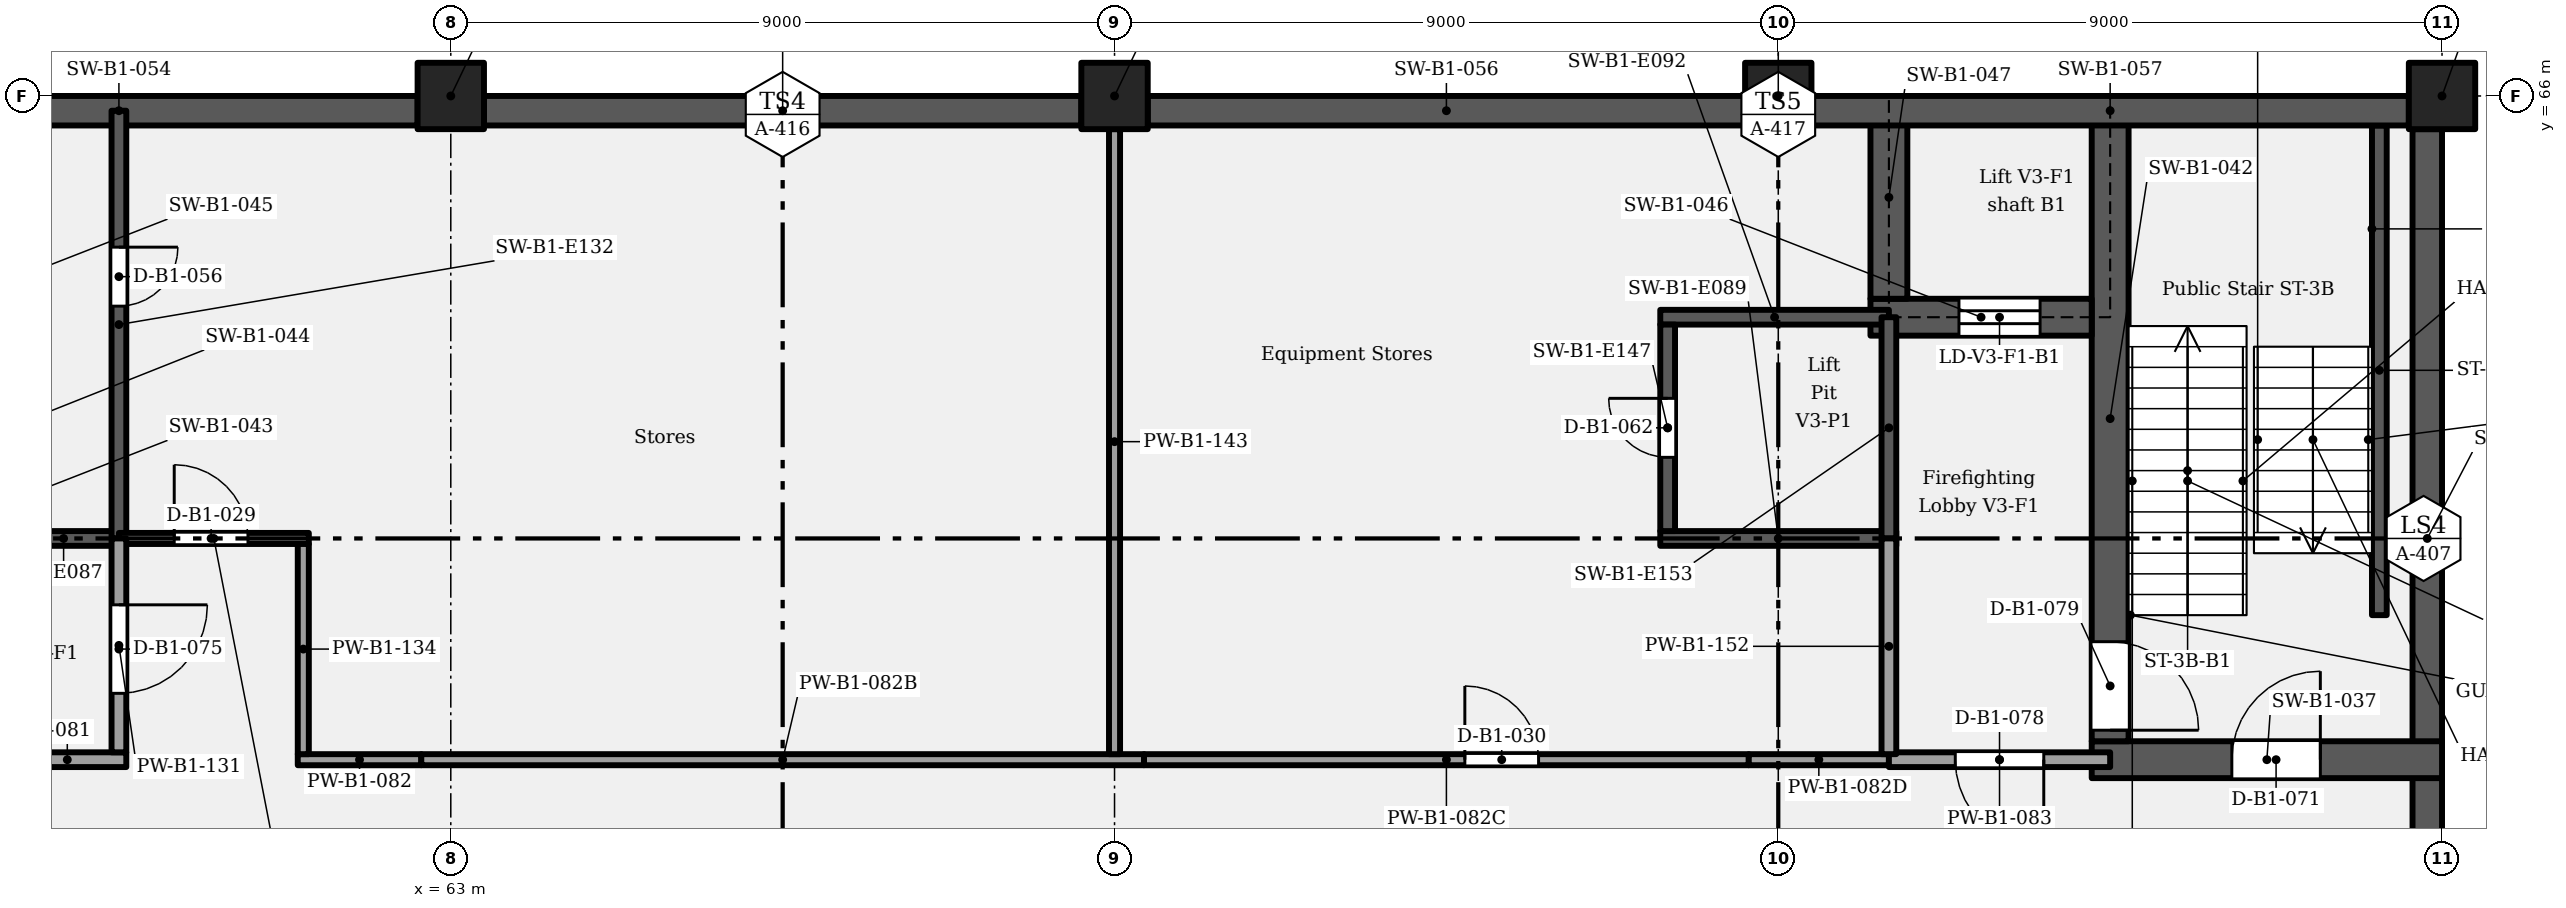
"""IFC4 building model, lengths in metres.
Left out: names, types, materials, properties, quantities, classifications, styles, units other than length and angle.
Written with IfcOpenShell. Run it as: python <this file> out.ifc"""

import sys

from ifc_helpers import new_model, si_unit, direction, frame, frame_2d, origin, origin_2d, place, context, subcontext, project, spatial, rectangle, extrude, element, fill, save


model = new_model("IFC4")
c1 = context("Model", 3, precision=1e-05, world=origin(), true_north=direction((0.0, 1.0)))
c2 = subcontext(c1, "Body", "Model", "MODEL_VIEW")
j1 = project(units=[si_unit("LENGTHUNIT", "METRE"), si_unit("PLANEANGLEUNIT", "RADIAN")], contexts=[c1])
p1 = place(None, origin())
s1 = spatial("IfcSite", under=j1, at=p1, CompositionType="ELEMENT")
p2 = place(p1, origin())
s2 = spatial("IfcBuilding", under=s1, at=p2, CompositionType="ELEMENT")
p3 = place(p2, frame((0.0, 0.0, -4.2)))
s3 = spatial("IfcBuildingStorey", under=s2, at=p3, CompositionType="ELEMENT", Elevation=-4.2)
for number, where, z_axis, x_axis in (
    (1, (63.0, 66.0, 0.0), (0.0, 0.0, 1.0), (1.0, 0.0, 0.0)),
    (2, (72.0, 66.0, 0.0), (0.0, 0.0, 1.0), (1.0, 0.0, 0.0)),
    (3, (81.0, 66.0, 0.0), (0.0, 0.0, 1.0), (1.0, 0.0, 0.0)),
    (4, (90.0, 66.0, 0.0), (0.0, 0.0, 1.0), (1.0, 0.0, 0.0)),
):
    element("IfcColumn", number, at=place(p3, frame(where, z_axis=z_axis, x_axis=x_axis)), inside=s3, PredefinedType="COLUMN", context=c2, shape_type="SweptSolid", body=[
        extrude(rectangle(XDim=0.9, YDim=0.9, at=origin_2d()), origin(), (0.0, 0.0, 1.0), 4.2),
    ])
p4 = place(p3, frame((89.8, 54.45, 0.0), z_axis=(0.0, 0.0, 1.0), x_axis=(0.0, 1.0, 0.0)))
e5 = element("IfcWall", 5, at=p4, inside=s3, PredefinedType="SOLIDWALL", context=c2, shape_type="SweptSolid", body=[
    extrude(rectangle(XDim=11.1, YDim=0.4, at=frame_2d((5.55, 0.0))), origin(), (0.0, 0.0, 1.0), 3.9),
])
p5 = place(p3, frame((85.25, 57.0, 0.0), z_axis=(0.0, 0.0, 1.0), x_axis=(1.0, 0.0, 0.0)))
e6 = element("IfcWall", 6, at=p5, inside=s3, PredefinedType="SHEAR", context=c2, shape_type="SweptSolid", body=[
    extrude(rectangle(XDim=4.75, YDim=0.5, at=frame_2d((2.375, 0.0))), origin(), (0.0, 0.0, 1.0), 3.9),
])
p6 = place(p5, frame((1.9, 0.0, 0.0)))
e7 = element("IfcOpeningElement", 7, at=p6, cuts=e6, PredefinedType="OPENING", context=c2, shape_type="SweptSolid", body=[
    extrude(rectangle(XDim=1.2, YDim=2.1, at=frame_2d((0.6, 1.05))), frame((0.0, 0.26, 0.0), z_axis=(0.0, -1.0, 0.0), x_axis=(1.0, 0.0, 0.0)), (0.0, 0.0, 1.0), 0.52),
])
p7 = place(p3, frame((85.5, 57.25, 0.0), z_axis=(0.0, 0.0, 1.0), x_axis=(0.0, 1.0, 0.0)))
e8 = element("IfcWall", 8, at=p7, inside=s3, PredefinedType="SHEAR", context=c2, shape_type="SweptSolid", body=[
    extrude(rectangle(XDim=8.75, YDim=0.5, at=frame_2d((4.375, 0.0))), origin(), (0.0, 0.0, 1.0), 3.9),
])
p8 = place(p7, frame((1.35, 0.0, 0.0), z_axis=(0.0, 0.0, 1.0), x_axis=(-1.0, 0.0, 0.0)))
e9 = element("IfcOpeningElement", 9, at=p8, cuts=e8, PredefinedType="OPENING", context=c2, shape_type="SweptSolid", body=[
    extrude(rectangle(XDim=1.2, YDim=2.1, at=frame_2d((0.6, 1.05))), frame((0.0, 0.26, 0.0), z_axis=(0.0, -1.0, 0.0), x_axis=(1.0, 0.0, 0.0)), (0.0, 0.0, 1.0), 0.52),
])
p9 = place(p3, frame((82.25, 63.0, 0.0), z_axis=(0.0, 0.0, 1.0), x_axis=(1.0, 0.0, 0.0)))
e10 = element("IfcWall", 10, at=p9, inside=s3, PredefinedType="SHEAR", context=c2, shape_type="SweptSolid", body=[
    extrude(rectangle(XDim=3.0, YDim=0.5, at=frame_2d((1.5, 0.0))), origin(), (0.0, 0.0, 1.0), 3.9),
])
p10 = place(p9, frame((1.2, 0.0, 0.0)))
e11 = element("IfcOpeningElement", 11, at=p10, cuts=e10, PredefinedType="OPENING", context=c2, shape_type="SweptSolid", body=[
    extrude(rectangle(XDim=1.1, YDim=2.1, at=frame_2d((0.55, 1.05))), frame((0.0, 0.26, 0.0), z_axis=(0.0, -1.0, 0.0), x_axis=(1.0, 0.0, 0.0)), (0.0, 0.0, 1.0), 0.52),
])
p11 = place(p3, frame((82.5, 63.25, 0.0), z_axis=(0.0, 0.0, 1.0), x_axis=(0.0, 1.0, 0.0)))
e12 = element("IfcWall", 12, at=p11, inside=s3, PredefinedType="SHEAR", context=c2, shape_type="SweptSolid", body=[
    extrude(rectangle(XDim=2.75, YDim=0.5, at=frame_2d((1.375, 0.0))), origin(), (0.0, 0.0, 1.0), 3.9),
])
for number, where, z_axis, x_axis in (
    (13, (54.45, 65.8, 0.0), (0.0, 0.0, 1.0), (1.0, 0.0, 0.0)),
    (14, (63.45, 65.8, 0.0), (0.0, 0.0, 1.0), (1.0, 0.0, 0.0)),
    (15, (72.45, 65.8, 0.0), (0.0, 0.0, 1.0), (1.0, 0.0, 0.0)),
    (16, (81.45, 65.8, 0.0), (0.0, 0.0, 1.0), (1.0, 0.0, 0.0)),
):
    element("IfcWall", number, at=place(p3, frame(where, z_axis=z_axis, x_axis=x_axis)), inside=s3, PredefinedType="SOLIDWALL", context=c2, shape_type="SweptSolid", body=[
        extrude(rectangle(XDim=8.1, YDim=0.4, at=frame_2d((4.05, 0.0))), origin(), (0.0, 0.0, 1.0), 3.9),
    ])
p12 = place(p3, frame((57.0, 57.0, 0.0), z_axis=(0.0, 0.0, 1.0), x_axis=(1.0, 0.0, 0.0)))
e17 = element("IfcWall", 17, at=p12, inside=s3, PredefinedType="PARTITIONING", context=c2, shape_type="SweptSolid", body=[
    extrude(rectangle(XDim=1.6, YDim=0.2, at=frame_2d((0.8, 0.0))), origin(), (0.0, 0.0, 1.0), 3.2),
])
p13 = place(p3, frame((60.925, 57.0, 0.0), z_axis=(0.0, 0.0, 1.0), x_axis=(1.0, 0.0, 0.0)))
e18 = element("IfcWall", 18, at=p13, inside=s3, PredefinedType="PARTITIONING", context=c2, shape_type="SweptSolid", body=[
    extrude(rectangle(XDim=1.675, YDim=0.15, at=frame_2d((0.837, 0.0))), origin(), (0.0, 0.0, 1.0), 3.2),
])
p14 = place(p3, frame((82.5, 57.0, 0.0), z_axis=(0.0, 0.0, 1.0), x_axis=(1.0, 0.0, 0.0)))
e19 = element("IfcWall", 19, at=p14, inside=s3, PredefinedType="PARTITIONING", context=c2, shape_type="SweptSolid", body=[
    extrude(rectangle(XDim=3.0, YDim=0.2, at=frame_2d((1.5, 0.0))), origin(), (0.0, 0.0, 1.0), 3.9),
])
p15 = place(p14, frame((2.1, 0.0, 0.0), z_axis=(0.0, 0.0, 1.0), x_axis=(-1.0, 0.0, 0.0)))
e20 = element("IfcOpeningElement", 20, at=p15, cuts=e19, PredefinedType="OPENING", context=c2, shape_type="SweptSolid", body=[
    extrude(rectangle(XDim=1.2, YDim=2.1, at=frame_2d((0.6, 1.05))), frame((0.0, 0.11, 0.0), z_axis=(0.0, -1.0, 0.0), x_axis=(1.0, 0.0, 0.0)), (0.0, 0.0, 1.0), 0.22),
])
p16 = place(p3, frame((57.0, 60.0, 0.0), z_axis=(0.0, 0.0, 1.0), x_axis=(1.0, 0.0, 0.0)))
e21 = element("IfcWall", 21, at=p16, inside=s3, PredefinedType="SHEAR", context=c2, shape_type="SweptSolid", body=[
    extrude(rectangle(XDim=1.5, YDim=0.2, at=frame_2d((0.75, 0.0))), origin(), (0.0, 0.0, 1.0), 3.9),
])
p17 = place(p3, frame((58.5, 60.0, 0.0), z_axis=(0.0, 0.0, 1.0), x_axis=(1.0, 0.0, 0.0)))
e22 = element("IfcWall", 22, at=p17, inside=s3, PredefinedType="PARTITIONING", context=c2, shape_type="SweptSolid", body=[
    extrude(rectangle(XDim=2.575, YDim=0.15, at=frame_2d((1.288, 0.0))), origin(), (0.0, 0.0, 1.0), 3.9),
])
p18 = place(p17, frame((0.75, 0.0, 0.0)))
e23 = element("IfcOpeningElement", 23, at=p18, cuts=e22, PredefinedType="OPENING", context=c2, shape_type="SweptSolid", body=[
    extrude(rectangle(XDim=1.0, YDim=2.1, at=frame_2d((0.5, 1.05))), frame((0.0, 0.085, 0.0), z_axis=(0.0, -1.0, 0.0), x_axis=(1.0, 0.0, 0.0)), (0.0, 0.0, 1.0), 0.17),
])
p19 = place(p3, frame((79.4, 60.0, 0.0), z_axis=(0.0, 0.0, 1.0), x_axis=(1.0, 0.0, 0.0)))
e24 = element("IfcWall", 24, at=p19, inside=s3, PredefinedType="SHEAR", context=c2, shape_type="SweptSolid", body=[
    extrude(rectangle(XDim=3.2, YDim=0.2, at=frame_2d((1.6, 0.0))), origin(), (0.0, 0.0, 1.0), 3.9),
])
p20 = place(p3, frame((79.4, 63.0, 0.0), z_axis=(0.0, 0.0, 1.0), x_axis=(1.0, 0.0, 0.0)))
e25 = element("IfcWall", 25, at=p20, inside=s3, PredefinedType="SHEAR", context=c2, shape_type="SweptSolid", body=[
    extrude(rectangle(XDim=3.1, YDim=0.2, at=frame_2d((1.55, 0.0))), origin(), (0.0, 0.0, 1.0), 3.9),
])
p21 = place(p3, frame((58.5, 57.1, 0.0), z_axis=(0.0, 0.0, 1.0), x_axis=(0.0, 1.0, 0.0)))
e26 = element("IfcWall", 26, at=p21, inside=s3, PredefinedType="PARTITIONING", context=c2, shape_type="SweptSolid", body=[
    extrude(rectangle(XDim=2.9, YDim=0.2, at=frame_2d((1.45, 0.0))), origin(), (0.0, 0.0, 1.0), 3.2),
])
p22 = place(p21, frame((2.0, 0.0, 0.0), z_axis=(0.0, 0.0, 1.0), x_axis=(-1.0, 0.0, 0.0)))
e27 = element("IfcOpeningElement", 27, at=p22, cuts=e26, PredefinedType="OPENING", context=c2, shape_type="SweptSolid", body=[
    extrude(rectangle(XDim=1.2, YDim=2.1, at=frame_2d((0.6, 1.05))), frame((0.0, 0.11, 0.0), z_axis=(0.0, -1.0, 0.0), x_axis=(1.0, 0.0, 0.0)), (0.0, 0.0, 1.0), 0.22),
])
p23 = place(p3, frame((58.5, 60.0, 0.0), z_axis=(0.0, 0.0, 1.0), x_axis=(0.0, 1.0, 0.0)))
e28 = element("IfcWall", 28, at=p23, inside=s3, PredefinedType="SHEAR", context=c2, shape_type="SweptSolid", body=[
    extrude(rectangle(XDim=5.8, YDim=0.2, at=frame_2d((2.9, 0.0))), origin(), (0.0, 0.0, 1.0), 3.9),
])
p24 = place(p23, frame((3.95, 0.0, 0.0), z_axis=(0.0, 0.0, 1.0), x_axis=(-1.0, 0.0, 0.0)))
e29 = element("IfcOpeningElement", 29, at=p24, cuts=e28, PredefinedType="OPENING", context=c2, shape_type="SweptSolid", body=[
    extrude(rectangle(XDim=0.8, YDim=2.0, at=frame_2d((0.4, 1.0))), frame((0.0, 0.11, 0.0), z_axis=(0.0, -1.0, 0.0), x_axis=(1.0, 0.0, 0.0)), (0.0, 0.0, 1.0), 0.22),
])
p25 = place(p3, frame((61.0, 57.075, 0.0), z_axis=(0.0, 0.0, 1.0), x_axis=(0.0, 1.0, 0.0)))
e30 = element("IfcWall", 30, at=p25, inside=s3, PredefinedType="PARTITIONING", context=c2, shape_type="SweptSolid", body=[
    extrude(rectangle(XDim=2.85, YDim=0.15, at=frame_2d((1.425, 0.0))), origin(), (0.0, 0.0, 1.0), 3.9),
])
p26 = place(p3, frame((72.0, 57.075, 0.0), z_axis=(0.0, 0.0, 1.0), x_axis=(0.0, 1.0, 0.0)))
e31 = element("IfcWall", 31, at=p26, inside=s3, PredefinedType="PARTITIONING", context=c2, shape_type="SweptSolid", body=[
    extrude(rectangle(XDim=8.475, YDim=0.15, at=frame_2d((4.238, 0.0))), origin(), (0.0, 0.0, 1.0), 3.15),
])
p27 = place(p3, frame((79.5, 60.1, 0.0), z_axis=(0.0, 0.0, 1.0), x_axis=(0.0, 1.0, 0.0)))
e32 = element("IfcWall", 32, at=p27, inside=s3, PredefinedType="SHEAR", context=c2, shape_type="SweptSolid", body=[
    extrude(rectangle(XDim=2.8, YDim=0.2, at=frame_2d((1.4, 0.0))), origin(), (0.0, 0.0, 1.0), 3.9),
])
p28 = place(p27, frame((1.0, 0.0, 0.0)))
e33 = element("IfcOpeningElement", 33, at=p28, cuts=e32, PredefinedType="OPENING", context=c2, shape_type="SweptSolid", body=[
    extrude(rectangle(XDim=0.8, YDim=2.0, at=frame_2d((0.4, 1.0))), frame((0.0, 0.11, 0.0), z_axis=(0.0, -1.0, 0.0), x_axis=(1.0, 0.0, 0.0)), (0.0, 0.0, 1.0), 0.22),
])
p29 = place(p3, frame((82.5, 57.075, 0.0), z_axis=(0.0, 0.0, 1.0), x_axis=(0.0, 1.0, 0.0)))
e34 = element("IfcWall", 34, at=p29, inside=s3, PredefinedType="PARTITIONING", context=c2, shape_type="SweptSolid", body=[
    extrude(rectangle(XDim=2.925, YDim=0.2, at=frame_2d((1.462, 0.0))), origin(), (0.0, 0.0, 1.0), 3.9),
])
p30 = place(p3, frame((82.5, 60.0, 0.0), z_axis=(0.0, 0.0, 1.0), x_axis=(0.0, 1.0, 0.0)))
e35 = element("IfcWall", 35, at=p30, inside=s3, PredefinedType="SHEAR", context=c2, shape_type="SweptSolid", body=[
    extrude(rectangle(XDim=3.0, YDim=0.2, at=frame_2d((1.5, 0.0))), origin(), (0.0, 0.0, 1.0), 3.9),
])
p31 = place(p3, frame((89.15, 58.96, 0.0), z_axis=(0.0, 0.0, 1.0), x_axis=(0.0, 1.0, 0.0)))
e36 = element("IfcWall", 36, at=p31, inside=s3, PredefinedType="SHEAR", context=c2, shape_type="SweptSolid", body=[
    extrude(rectangle(XDim=6.64, YDim=0.2, at=frame_2d((3.32, 0.0))), origin(), (0.0, 0.0, 1.0), 3.9),
])
p32 = place(p3, frame((62.6, 57.0, 0.0), z_axis=(0.0, 0.0, 1.0), x_axis=(1.0, 0.0, 0.0)))
e37 = element("IfcWall", 37, at=p32, inside=s3, PredefinedType="PARTITIONING", context=c2, shape_type="SweptSolid", body=[
    extrude(rectangle(XDim=9.8, YDim=0.15, at=frame_2d((4.9, 0.0))), origin(), (0.0, 0.0, 1.0), 3.9),
])
p33 = place(p3, frame((72.4, 57.0, 0.0), z_axis=(0.0, 0.0, 1.0), x_axis=(1.0, 0.0, 0.0)))
e38 = element("IfcWall", 38, at=p33, inside=s3, PredefinedType="PARTITIONING", context=c2, shape_type="SweptSolid", body=[
    extrude(rectangle(XDim=8.2, YDim=0.15, at=frame_2d((4.1, 0.0))), origin(), (0.0, 0.0, 1.0), 3.2),
])
p34 = place(p33, frame((4.35, 0.0, 0.0)))
e39 = element("IfcOpeningElement", 39, at=p34, cuts=e38, PredefinedType="OPENING", context=c2, shape_type="SweptSolid", body=[
    extrude(rectangle(XDim=1.0, YDim=2.1, at=frame_2d((0.5, 1.05))), frame((0.0, 0.085, 0.0), z_axis=(0.0, -1.0, 0.0), x_axis=(1.0, 0.0, 0.0)), (0.0, 0.0, 1.0), 0.17),
])
p35 = place(p3, frame((80.6, 57.0, 0.0), z_axis=(0.0, 0.0, 1.0), x_axis=(1.0, 0.0, 0.0)))
e40 = element("IfcWall", 40, at=p35, inside=s3, PredefinedType="PARTITIONING", context=c2, shape_type="SweptSolid", body=[
    extrude(rectangle(XDim=1.9, YDim=0.15, at=frame_2d((0.95, 0.0))), origin(), (0.0, 0.0, 1.0), 3.9),
])
p36 = place(p18, origin())
e41 = element("IfcDoor", 41, at=p36, inside=s3, OperationType="SINGLE_SWING_LEFT", PredefinedType="DOOR", context=c2, shape_type="SweptSolid", body=[
    extrude(rectangle(XDim=1.0, YDim=2.1, at=frame_2d((0.5, 1.05))), frame((0.0, 0.025, 0.0), z_axis=(0.0, -1.0, 0.0), x_axis=(1.0, 0.0, 0.0)), (0.0, 0.0, 1.0), 0.05),
])
fill(e23, e41)
p37 = place(p34, origin())
e42 = element("IfcDoor", 42, at=p37, inside=s3, OperationType="SINGLE_SWING_LEFT", PredefinedType="DOOR", context=c2, shape_type="SweptSolid", body=[
    extrude(rectangle(XDim=1.0, YDim=2.1, at=frame_2d((0.5, 1.05))), frame((0.0, 0.025, 0.0), z_axis=(0.0, -1.0, 0.0), x_axis=(1.0, 0.0, 0.0)), (0.0, 0.0, 1.0), 0.05),
])
fill(e39, e42)
p38 = place(p24, origin())
e43 = element("IfcDoor", 43, at=p38, inside=s3, OperationType="SINGLE_SWING_LEFT", PredefinedType="DOOR", context=c2, shape_type="SweptSolid", body=[
    extrude(rectangle(XDim=0.8, YDim=2.0, at=frame_2d((0.4, 1.0))), frame((0.0, 0.025, 0.0), z_axis=(0.0, -1.0, 0.0), x_axis=(1.0, 0.0, 0.0)), (0.0, 0.0, 1.0), 0.05),
])
fill(e29, e43)
p39 = place(p28, origin())
e44 = element("IfcDoor", 44, at=p39, inside=s3, OperationType="SINGLE_SWING_RIGHT", PredefinedType="DOOR", context=c2, shape_type="SweptSolid", body=[
    extrude(rectangle(XDim=0.8, YDim=2.0, at=frame_2d((0.4, 1.0))), frame((0.0, 0.025, 0.0), z_axis=(0.0, -1.0, 0.0), x_axis=(1.0, 0.0, 0.0)), (0.0, 0.0, 1.0), 0.05),
])
fill(e33, e44)
p40 = place(p6, origin())
e45 = element("IfcDoor", 45, at=p40, inside=s3, OperationType="SINGLE_SWING_RIGHT", PredefinedType="DOOR", context=c2, shape_type="SweptSolid", body=[
    extrude(rectangle(XDim=1.2, YDim=2.1, at=frame_2d((0.6, 1.05))), frame((0.0, 0.025, 0.0), z_axis=(0.0, -1.0, 0.0), x_axis=(1.0, 0.0, 0.0)), (0.0, 0.0, 1.0), 0.05),
])
fill(e7, e45)
p41 = place(p22, origin())
e46 = element("IfcDoor", 46, at=p41, inside=s3, OperationType="SINGLE_SWING_LEFT", PredefinedType="DOOR", context=c2, shape_type="SweptSolid", body=[
    extrude(rectangle(XDim=1.2, YDim=2.1, at=frame_2d((0.6, 1.05))), frame((0.0, 0.025, 0.0), z_axis=(0.0, -1.0, 0.0), x_axis=(1.0, 0.0, 0.0)), (0.0, 0.0, 1.0), 0.05),
])
fill(e27, e46)
p42 = place(p15, origin())
e47 = element("IfcDoor", 47, at=p42, inside=s3, OperationType="SINGLE_SWING_LEFT", PredefinedType="DOOR", context=c2, shape_type="SweptSolid", body=[
    extrude(rectangle(XDim=1.2, YDim=2.1, at=frame_2d((0.6, 1.05))), frame((0.0, 0.025, 0.0), z_axis=(0.0, -1.0, 0.0), x_axis=(1.0, 0.0, 0.0)), (0.0, 0.0, 1.0), 0.05),
])
fill(e20, e47)
p43 = place(p8, origin())
e48 = element("IfcDoor", 48, at=p43, inside=s3, OperationType="SINGLE_SWING_RIGHT", PredefinedType="DOOR", context=c2, shape_type="SweptSolid", body=[
    extrude(rectangle(XDim=1.2, YDim=2.1, at=frame_2d((0.6, 1.05))), frame((0.0, 0.025, 0.0), z_axis=(0.0, -1.0, 0.0), x_axis=(1.0, 0.0, 0.0)), (0.0, 0.0, 1.0), 0.05),
])
fill(e9, e48)
p44 = place(p10, origin())
e49 = element("IfcDoor", 49, at=p44, inside=s3, OperationType="SLIDING_TO_LEFT", PredefinedType="DOOR", context=c2, shape_type="SweptSolid", body=[
    extrude(rectangle(XDim=1.1, YDim=2.1, at=frame_2d((0.55, 1.05))), frame((0.0, 0.025, 0.0), z_axis=(0.0, -1.0, 0.0), x_axis=(1.0, 0.0, 0.0)), (0.0, 0.0, 1.0), 0.05),
])
fill(e11, e49)
save(model, sys.argv[1])
